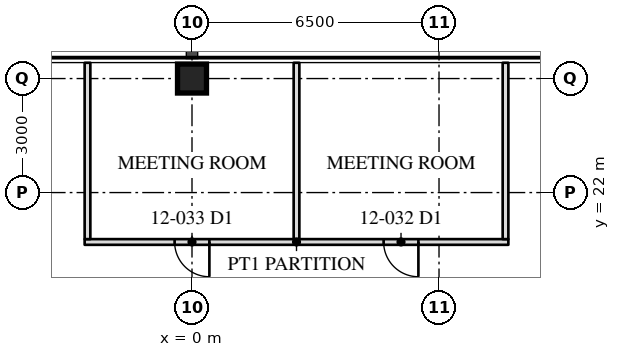
"""IFC4 building model, lengths in metres.
Left out: names, types, materials, properties, quantities, classifications, styles, units other than length and angle.
Written with IfcOpenShell. Run it as: python <this file> out.ifc"""

import sys

from ifc_helpers import new_model, si_unit, direction, frame, frame_2d, origin, origin_2d, place, context, subcontext, project, spatial, rectangle, hollow_rectangle, extrude, element, fill, save


model = new_model("IFC4")
c1 = context("Model", 3, precision=1e-05, world=origin(), true_north=direction((0.0, 1.0)))
c2 = subcontext(c1, "Body", "Model", "MODEL_VIEW")
j1 = project(units=[si_unit("LENGTHUNIT", "METRE"), si_unit("PLANEANGLEUNIT", "RADIAN")], contexts=[c1])
p1 = place(None, origin())
s1 = spatial("IfcSite", under=j1, at=p1, CompositionType="ELEMENT")
p2 = place(p1, origin())
s2 = spatial("IfcBuilding", under=s1, at=p2, CompositionType="ELEMENT")
p3 = place(p2, frame((0.0, 0.0, 52.9)))
s3 = spatial("IfcBuildingStorey", under=s2, at=p3, CompositionType="ELEMENT", Elevation=52.9)
p4 = place(p3, frame((0.0, 25.0, 0.0), z_axis=(0.0, 0.0, 1.0), x_axis=(1.0, 0.0, 0.0)))
e1 = element("IfcColumn", 1, at=p4, inside=s3, PredefinedType="COLUMN", context=c2, shape_type="SweptSolid", body=[
    extrude(hollow_rectangle(XDim=0.762, YDim=0.762, WallThickness=0.127, at=origin_2d()), origin(), (0.0, 0.0, 1.0), 4.1),
])
p5 = place(p3, frame((8.325, 20.7, 0.0), z_axis=(0.0, 0.0, 1.0), x_axis=(-1.0, 0.0, 0.0)))
e2 = element("IfcWall", 2, at=p5, inside=s3, PredefinedType="PARTITIONING", context=c2, shape_type="SweptSolid", body=[
    extrude(rectangle(XDim=11.15, YDim=0.15, at=frame_2d((5.575, 0.0))), origin(), (0.0, 0.0, 1.0), 3.91),
])
p6 = place(p5, frame((2.367, 0.0, 0.0)))
e3 = element("IfcOpeningElement", 3, at=p6, cuts=e2, PredefinedType="OPENING", context=c2, shape_type="SweptSolid", body=[
    extrude(rectangle(XDim=0.915, YDim=2.134, at=frame_2d((0.458, 1.067))), frame((0.0, 0.085, 0.0), z_axis=(0.0, -1.0, 0.0), x_axis=(1.0, 0.0, 0.0)), (0.0, 0.0, 1.0), 0.17),
])
p7 = place(p5, frame((7.867, 0.0, 0.0)))
e4 = element("IfcOpeningElement", 4, at=p7, cuts=e2, PredefinedType="OPENING", context=c2, shape_type="SweptSolid", body=[
    extrude(rectangle(XDim=0.915, YDim=2.134, at=frame_2d((0.458, 1.067))), frame((0.0, 0.085, 0.0), z_axis=(0.0, -1.0, 0.0), x_axis=(1.0, 0.0, 0.0)), (0.0, 0.0, 1.0), 0.17),
])
for number, where, z_axis, x_axis in (
    (5, (8.25, 20.775, 0.0), (0.0, 0.0, 1.0), (0.0, 1.0, 0.0)),
    (6, (2.75, 20.775, 0.0), (0.0, 0.0, 1.0), (0.0, 1.0, 0.0)),
    (7, (-2.75, 20.775, 0.0), (0.0, 0.0, 1.0), (0.0, 1.0, 0.0)),
):
    element("IfcWall", number, at=place(p3, frame(where, z_axis=z_axis, x_axis=x_axis)), inside=s3, PredefinedType="PARTITIONING", context=c2, shape_type="SweptSolid", body=[
        extrude(rectangle(XDim=4.64, YDim=0.15, at=frame_2d((2.32, 0.0))), origin(), (0.0, 0.0, 1.0), 3.91),
    ])
p8 = place(p6, origin())
e8 = element("IfcDoor", 8, at=p8, inside=s3, OperationType="SINGLE_SWING_LEFT", PredefinedType="DOOR", context=c2, shape_type="SweptSolid", body=[
    extrude(rectangle(XDim=0.915, YDim=2.134, at=frame_2d((0.458, 1.067))), frame((0.0, 0.025, 0.0), z_axis=(0.0, -1.0, 0.0), x_axis=(1.0, 0.0, 0.0)), (0.0, 0.0, 1.0), 0.05),
])
fill(e3, e8)
p9 = place(p7, origin())
e9 = element("IfcDoor", 9, at=p9, inside=s3, OperationType="SINGLE_SWING_LEFT", PredefinedType="DOOR", context=c2, shape_type="SweptSolid", body=[
    extrude(rectangle(XDim=0.915, YDim=2.134, at=frame_2d((0.458, 1.067))), frame((0.0, 0.025, 0.0), z_axis=(0.0, -1.0, 0.0), x_axis=(1.0, 0.0, 0.0)), (0.0, 0.0, 1.0), 0.05),
])
fill(e4, e9)
save(model, sys.argv[1])
